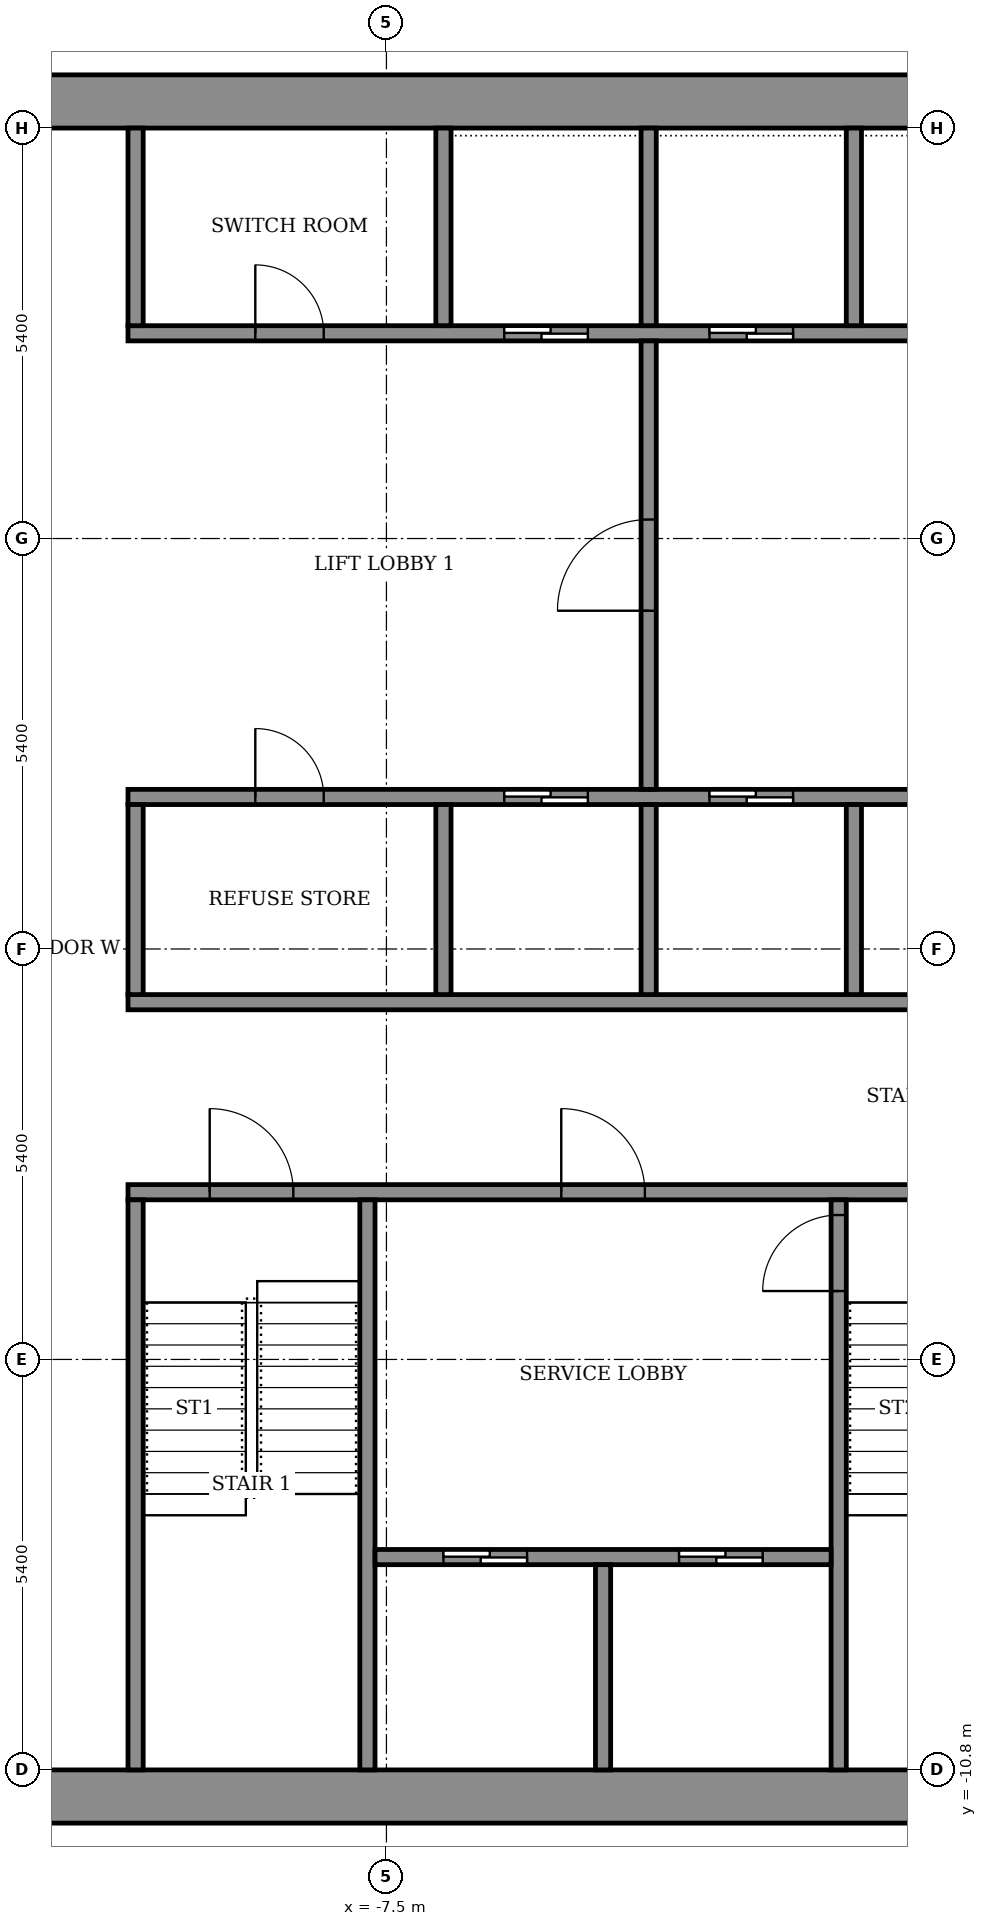
"""IFC4 building model, lengths in metres.
Left out: names, types, materials, properties, quantities, classifications, styles, units other than length and angle.
Written with IfcOpenShell. Run it as: python <this file> out.ifc"""

import sys

from ifc_helpers import new_model, si_unit, direction, frame, frame_2d, origin, place, context, subcontext, project, spatial, rectangle, extrude, element, fill, save


model = new_model("IFC4")
c1 = context("Model", 3, precision=1e-05, world=origin(), true_north=direction((0.0, 1.0)))
c2 = subcontext(c1, "Body", "Model", "MODEL_VIEW")
j1 = project(units=[si_unit("LENGTHUNIT", "METRE"), si_unit("PLANEANGLEUNIT", "RADIAN")], contexts=[c1])
p1 = place(None, origin())
s1 = spatial("IfcSite", under=j1, at=p1, CompositionType="ELEMENT")
p2 = place(p1, origin())
s2 = spatial("IfcBuilding", under=s1, at=p2, CompositionType="ELEMENT")
p3 = place(p2, frame((0.0, 0.0, 271.7)))
s3 = spatial("IfcBuildingStorey", under=s2, at=p3, CompositionType="ELEMENT", Elevation=271.7)
for number, where, z_axis, x_axis in (
    (1, (-14.5, -11.15, 0.0), (0.0, 0.0, 1.0), (1.0, 0.0, 0.0)),
    (2, (-14.5, 11.15, 0.0), (0.0, 0.0, 1.0), (1.0, 0.0, 0.0)),
):
    element("IfcWall", number, at=place(p3, frame(where, z_axis=z_axis, x_axis=x_axis)), inside=s3, PredefinedType="SHEAR", context=c2, shape_type="SweptSolid", body=[
        extrude(rectangle(XDim=29.0, YDim=0.7, at=frame_2d((14.5, 0.0))), origin(), (0.0, 0.0, 1.0), 3.6),
    ])
p4 = place(p3, frame((-10.9, -3.2, 0.0), z_axis=(0.0, 0.0, 1.0), x_axis=(1.0, 0.0, 0.0)))
e3 = element("IfcWall", 3, at=p4, inside=s3, PredefinedType="SHEAR", context=c2, shape_type="SweptSolid", body=[
    extrude(rectangle(XDim=21.8, YDim=0.2, at=frame_2d((10.9, 0.0))), origin(), (0.0, 0.0, 1.0), 3.05),
])
p5 = place(p4, frame((1.075, 0.0, 0.0)))
e4 = element("IfcOpeningElement", 4, at=p5, cuts=e3, PredefinedType="OPENING", context=c2, shape_type="SweptSolid", body=[
    extrude(rectangle(XDim=1.1, YDim=2.1, at=frame_2d((0.55, 1.05))), frame((0.0, 0.11, 0.0), z_axis=(0.0, -1.0, 0.0), x_axis=(1.0, 0.0, 0.0)), (0.0, 0.0, 1.0), 0.22),
])
p6 = place(p4, frame((10.325, 0.0, 0.0)))
e5 = element("IfcOpeningElement", 5, at=p6, cuts=e3, PredefinedType="OPENING", context=c2, shape_type="SweptSolid", body=[
    extrude(rectangle(XDim=1.1, YDim=2.1, at=frame_2d((0.55, 1.05))), frame((0.0, 0.11, 0.0), z_axis=(0.0, -1.0, 0.0), x_axis=(1.0, 0.0, 0.0)), (0.0, 0.0, 1.0), 0.22),
])
p7 = place(p4, frame((19.625, 0.0, 0.0)))
e6 = element("IfcOpeningElement", 6, at=p7, cuts=e3, PredefinedType="OPENING", context=c2, shape_type="SweptSolid", body=[
    extrude(rectangle(XDim=1.1, YDim=2.1, at=frame_2d((0.55, 1.05))), frame((0.0, 0.11, 0.0), z_axis=(0.0, -1.0, 0.0), x_axis=(1.0, 0.0, 0.0)), (0.0, 0.0, 1.0), 0.22),
])
p8 = place(p4, frame((5.7, 0.0, 0.0)))
e7 = element("IfcOpeningElement", 7, at=p8, cuts=e3, PredefinedType="OPENING", context=c2, shape_type="SweptSolid", body=[
    extrude(rectangle(XDim=1.1, YDim=2.1, at=frame_2d((0.55, 1.05))), frame((0.0, 0.11, 0.0), z_axis=(0.0, -1.0, 0.0), x_axis=(1.0, 0.0, 0.0)), (0.0, 0.0, 1.0), 0.22),
])
p9 = place(p4, frame((14.975, 0.0, 0.0)))
e8 = element("IfcOpeningElement", 8, at=p9, cuts=e3, PredefinedType="OPENING", context=c2, shape_type="SweptSolid", body=[
    extrude(rectangle(XDim=1.1, YDim=2.1, at=frame_2d((0.55, 1.05))), frame((0.0, 0.11, 0.0), z_axis=(0.0, -1.0, 0.0), x_axis=(1.0, 0.0, 0.0)), (0.0, 0.0, 1.0), 0.22),
])
p10 = place(p3, frame((-10.9, -0.7, 0.0), z_axis=(0.0, 0.0, 1.0), x_axis=(1.0, 0.0, 0.0)))
e9 = element("IfcWall", 9, at=p10, inside=s3, PredefinedType="SHEAR", context=c2, shape_type="SweptSolid", body=[
    extrude(rectangle(XDim=21.8, YDim=0.2, at=frame_2d((10.9, 0.0))), origin(), (0.0, 0.0, 1.0), 3.05),
])
p11 = place(p3, frame((-10.9, 2.0, 0.0), z_axis=(0.0, 0.0, 1.0), x_axis=(1.0, 0.0, 0.0)))
e10 = element("IfcWall", 10, at=p11, inside=s3, PredefinedType="SHEAR", context=c2, shape_type="SweptSolid", body=[
    extrude(rectangle(XDim=21.8, YDim=0.2, at=frame_2d((10.9, 0.0))), origin(), (0.0, 0.0, 1.0), 3.05),
])
p12 = place(p11, frame((4.95, 0.0, 0.0)))
e11 = element("IfcOpeningElement", 11, at=p12, cuts=e10, PredefinedType="OPENING", context=c2, shape_type="SweptSolid", body=[
    extrude(rectangle(XDim=1.1, YDim=2.1, at=frame_2d((0.55, 1.05))), frame((0.0, 0.11, 0.0), z_axis=(0.0, -1.0, 0.0), x_axis=(1.0, 0.0, 0.0)), (0.0, 0.0, 1.0), 0.22),
])
p13 = place(p11, frame((7.65, 0.0, 0.0)))
e12 = element("IfcOpeningElement", 12, at=p13, cuts=e10, PredefinedType="OPENING", context=c2, shape_type="SweptSolid", body=[
    extrude(rectangle(XDim=1.1, YDim=2.1, at=frame_2d((0.55, 1.05))), frame((0.0, 0.11, 0.0), z_axis=(0.0, -1.0, 0.0), x_axis=(1.0, 0.0, 0.0)), (0.0, 0.0, 1.0), 0.22),
])
p14 = place(p11, frame((10.35, 0.0, 0.0)))
e13 = element("IfcOpeningElement", 13, at=p14, cuts=e10, PredefinedType="OPENING", context=c2, shape_type="SweptSolid", body=[
    extrude(rectangle(XDim=1.1, YDim=2.1, at=frame_2d((0.55, 1.05))), frame((0.0, 0.11, 0.0), z_axis=(0.0, -1.0, 0.0), x_axis=(1.0, 0.0, 0.0)), (0.0, 0.0, 1.0), 0.22),
])
p15 = place(p11, frame((1.675, 0.0, 0.0)))
e14 = element("IfcOpeningElement", 14, at=p15, cuts=e10, PredefinedType="OPENING", context=c2, shape_type="SweptSolid", body=[
    extrude(rectangle(XDim=0.9, YDim=2.1, at=frame_2d((0.45, 1.05))), frame((0.0, 0.11, 0.0), z_axis=(0.0, -1.0, 0.0), x_axis=(1.0, 0.0, 0.0)), (0.0, 0.0, 1.0), 0.22),
])
p16 = place(p11, frame((13.825, 0.0, 0.0)))
e15 = element("IfcOpeningElement", 15, at=p16, cuts=e10, PredefinedType="OPENING", context=c2, shape_type="SweptSolid", body=[
    extrude(rectangle(XDim=0.9, YDim=2.1, at=frame_2d((0.45, 1.05))), frame((0.0, 0.11, 0.0), z_axis=(0.0, -1.0, 0.0), x_axis=(1.0, 0.0, 0.0)), (0.0, 0.0, 1.0), 0.22),
])
p17 = place(p11, frame((18.55, 0.0, 0.0)))
e16 = element("IfcOpeningElement", 16, at=p17, cuts=e10, PredefinedType="OPENING", context=c2, shape_type="SweptSolid", body=[
    extrude(rectangle(XDim=0.9, YDim=2.1, at=frame_2d((0.45, 1.05))), frame((0.0, 0.11, 0.0), z_axis=(0.0, -1.0, 0.0), x_axis=(1.0, 0.0, 0.0)), (0.0, 0.0, 1.0), 0.22),
])
p18 = place(p3, frame((-10.9, 8.1, 0.0), z_axis=(0.0, 0.0, 1.0), x_axis=(1.0, 0.0, 0.0)))
e17 = element("IfcWall", 17, at=p18, inside=s3, PredefinedType="SHEAR", context=c2, shape_type="SweptSolid", body=[
    extrude(rectangle(XDim=21.8, YDim=0.2, at=frame_2d((10.9, 0.0))), origin(), (0.0, 0.0, 1.0), 3.05),
])
p19 = place(p18, frame((4.95, 0.0, 0.0)))
e18 = element("IfcOpeningElement", 18, at=p19, cuts=e17, PredefinedType="OPENING", context=c2, shape_type="SweptSolid", body=[
    extrude(rectangle(XDim=1.1, YDim=2.1, at=frame_2d((0.55, 1.05))), frame((0.0, 0.11, 0.0), z_axis=(0.0, -1.0, 0.0), x_axis=(1.0, 0.0, 0.0)), (0.0, 0.0, 1.0), 0.22),
])
p20 = place(p18, frame((7.65, 0.0, 0.0)))
e19 = element("IfcOpeningElement", 19, at=p20, cuts=e17, PredefinedType="OPENING", context=c2, shape_type="SweptSolid", body=[
    extrude(rectangle(XDim=1.1, YDim=2.1, at=frame_2d((0.55, 1.05))), frame((0.0, 0.11, 0.0), z_axis=(0.0, -1.0, 0.0), x_axis=(1.0, 0.0, 0.0)), (0.0, 0.0, 1.0), 0.22),
])
p21 = place(p18, frame((10.35, 0.0, 0.0)))
e20 = element("IfcOpeningElement", 20, at=p21, cuts=e17, PredefinedType="OPENING", context=c2, shape_type="SweptSolid", body=[
    extrude(rectangle(XDim=1.1, YDim=2.1, at=frame_2d((0.55, 1.05))), frame((0.0, 0.11, 0.0), z_axis=(0.0, -1.0, 0.0), x_axis=(1.0, 0.0, 0.0)), (0.0, 0.0, 1.0), 0.22),
])
p22 = place(p18, frame((1.675, 0.0, 0.0)))
e21 = element("IfcOpeningElement", 21, at=p22, cuts=e17, PredefinedType="OPENING", context=c2, shape_type="SweptSolid", body=[
    extrude(rectangle(XDim=0.9, YDim=2.1, at=frame_2d((0.45, 1.05))), frame((0.0, 0.11, 0.0), z_axis=(0.0, -1.0, 0.0), x_axis=(1.0, 0.0, 0.0)), (0.0, 0.0, 1.0), 0.22),
])
p23 = place(p18, frame((13.825, 0.0, 0.0)))
e22 = element("IfcOpeningElement", 22, at=p23, cuts=e17, PredefinedType="OPENING", context=c2, shape_type="SweptSolid", body=[
    extrude(rectangle(XDim=0.9, YDim=2.1, at=frame_2d((0.45, 1.05))), frame((0.0, 0.11, 0.0), z_axis=(0.0, -1.0, 0.0), x_axis=(1.0, 0.0, 0.0)), (0.0, 0.0, 1.0), 0.22),
])
p24 = place(p18, frame((18.55, 0.0, 0.0)))
e23 = element("IfcOpeningElement", 23, at=p24, cuts=e17, PredefinedType="OPENING", context=c2, shape_type="SweptSolid", body=[
    extrude(rectangle(XDim=0.9, YDim=2.1, at=frame_2d((0.45, 1.05))), frame((0.0, 0.11, 0.0), z_axis=(0.0, -1.0, 0.0), x_axis=(1.0, 0.0, 0.0)), (0.0, 0.0, 1.0), 0.22),
])
for number, where, z_axis, x_axis in (
    (24, (-10.8, -10.8, 0.0), (0.0, 0.0, 1.0), (0.0, 1.0, 0.0)),
    (25, (-7.75, -10.8, 0.0), (0.0, 0.0, 1.0), (0.0, 1.0, 0.0)),
):
    element("IfcWall", number, at=place(p3, frame(where, z_axis=z_axis, x_axis=x_axis)), inside=s3, PredefinedType="SHEAR", context=c2, shape_type="SweptSolid", body=[
        extrude(rectangle(XDim=7.5, YDim=0.2, at=frame_2d((3.75, 0.0))), origin(), (0.0, 0.0, 1.0), 3.05),
    ])
p25 = place(p3, frame((-1.55, -10.8, 0.0), z_axis=(0.0, 0.0, 1.0), x_axis=(0.0, 1.0, 0.0)))
e26 = element("IfcWall", 26, at=p25, inside=s3, PredefinedType="SHEAR", context=c2, shape_type="SweptSolid", body=[
    extrude(rectangle(XDim=7.5, YDim=0.2, at=frame_2d((3.75, 0.0))), origin(), (0.0, 0.0, 1.0), 3.05),
])
p26 = place(p25, frame((6.3, 0.0, 0.0)))
e27 = element("IfcOpeningElement", 27, at=p26, cuts=e26, PredefinedType="OPENING", context=c2, shape_type="SweptSolid", body=[
    extrude(rectangle(XDim=1.0, YDim=2.1, at=frame_2d((0.5, 1.05))), frame((0.0, 0.11, 0.0), z_axis=(0.0, -1.0, 0.0), x_axis=(1.0, 0.0, 0.0)), (0.0, 0.0, 1.0), 0.22),
])
p27 = place(p3, frame((-7.65, -8.0, 0.0), z_axis=(0.0, 0.0, 1.0), x_axis=(1.0, 0.0, 0.0)))
e28 = element("IfcWall", 28, at=p27, inside=s3, PredefinedType="SHEAR", context=c2, shape_type="SweptSolid", body=[
    extrude(rectangle(XDim=6.0, YDim=0.2, at=frame_2d((3.0, 0.0))), origin(), (0.0, 0.0, 1.0), 3.05),
])
p28 = place(p27, frame((0.9, 0.0, 0.0)))
e29 = element("IfcOpeningElement", 29, at=p28, cuts=e28, PredefinedType="OPENING", context=c2, shape_type="SweptSolid", body=[
    extrude(rectangle(XDim=1.1, YDim=2.1, at=frame_2d((0.55, 1.05))), frame((0.0, 0.11, 0.0), z_axis=(0.0, -1.0, 0.0), x_axis=(1.0, 0.0, 0.0)), (0.0, 0.0, 1.0), 0.22),
])
p29 = place(p27, frame((4.0, 0.0, 0.0)))
e30 = element("IfcOpeningElement", 30, at=p29, cuts=e28, PredefinedType="OPENING", context=c2, shape_type="SweptSolid", body=[
    extrude(rectangle(XDim=1.1, YDim=2.1, at=frame_2d((0.55, 1.05))), frame((0.0, 0.11, 0.0), z_axis=(0.0, -1.0, 0.0), x_axis=(1.0, 0.0, 0.0)), (0.0, 0.0, 1.0), 0.22),
])
p30 = place(p3, frame((-4.65, -10.8, 0.0), z_axis=(0.0, 0.0, 1.0), x_axis=(0.0, 1.0, 0.0)))
e31 = element("IfcWall", 31, at=p30, inside=s3, PredefinedType="SHEAR", context=c2, shape_type="SweptSolid", body=[
    extrude(rectangle(XDim=2.7, YDim=0.2, at=frame_2d((1.35, 0.0))), origin(), (0.0, 0.0, 1.0), 3.05),
])
p31 = place(p3, frame((-10.8, -0.6, 0.0), z_axis=(0.0, 0.0, 1.0), x_axis=(0.0, 1.0, 0.0)))
e32 = element("IfcWall", 32, at=p31, inside=s3, PredefinedType="STANDARD", context=c2, shape_type="SweptSolid", body=[
    extrude(rectangle(XDim=2.5, YDim=0.2, at=frame_2d((1.25, 0.0))), origin(), (0.0, 0.0, 1.0), 3.05),
])
for number, where, z_axis, x_axis in (
    (33, (-6.75, -0.6, 0.0), (0.0, 0.0, 1.0), (0.0, 1.0, 0.0)),
    (34, (-4.05, -0.6, 0.0), (0.0, 0.0, 1.0), (0.0, 1.0, 0.0)),
    (35, (-1.35, -0.6, 0.0), (0.0, 0.0, 1.0), (0.0, 1.0, 0.0)),
):
    element("IfcWall", number, at=place(p3, frame(where, z_axis=z_axis, x_axis=x_axis)), inside=s3, PredefinedType="SHEAR", context=c2, shape_type="SweptSolid", body=[
        extrude(rectangle(XDim=2.5, YDim=0.2, at=frame_2d((1.25, 0.0))), origin(), (0.0, 0.0, 1.0), 3.05),
    ])
p32 = place(p3, frame((-10.8, 8.2, 0.0), z_axis=(0.0, 0.0, 1.0), x_axis=(0.0, 1.0, 0.0)))
e36 = element("IfcWall", 36, at=p32, inside=s3, PredefinedType="STANDARD", context=c2, shape_type="SweptSolid", body=[
    extrude(rectangle(XDim=2.6, YDim=0.2, at=frame_2d((1.3, 0.0))), origin(), (0.0, 0.0, 1.0), 3.05),
])
for number, where, z_axis, x_axis in (
    (37, (-6.75, 8.2, 0.0), (0.0, 0.0, 1.0), (0.0, 1.0, 0.0)),
    (38, (-4.05, 8.2, 0.0), (0.0, 0.0, 1.0), (0.0, 1.0, 0.0)),
    (39, (-1.35, 8.2, 0.0), (0.0, 0.0, 1.0), (0.0, 1.0, 0.0)),
):
    element("IfcWall", number, at=place(p3, frame(where, z_axis=z_axis, x_axis=x_axis)), inside=s3, PredefinedType="SHEAR", context=c2, shape_type="SweptSolid", body=[
        extrude(rectangle(XDim=2.6, YDim=0.2, at=frame_2d((1.3, 0.0))), origin(), (0.0, 0.0, 1.0), 3.05),
    ])
p33 = place(p3, frame((-4.05, 2.1, 0.0), z_axis=(0.0, 0.0, 1.0), x_axis=(0.0, 1.0, 0.0)))
e40 = element("IfcWall", 40, at=p33, inside=s3, PredefinedType="STANDARD", context=c2, shape_type="SweptSolid", body=[
    extrude(rectangle(XDim=5.9, YDim=0.2, at=frame_2d((2.95, 0.0))), origin(), (0.0, 0.0, 1.0), 3.05),
])
p34 = place(p33, frame((2.35, 0.0, 0.0)))
e41 = element("IfcOpeningElement", 41, at=p34, cuts=e40, PredefinedType="OPENING", context=c2, shape_type="SweptSolid", body=[
    extrude(rectangle(XDim=1.2, YDim=2.1, at=frame_2d((0.6, 1.05))), frame((0.0, 0.11, 0.0), z_axis=(0.0, -1.0, 0.0), x_axis=(1.0, 0.0, 0.0)), (0.0, 0.0, 1.0), 0.22),
])
p35 = place(p12, origin())
e42 = element("IfcDoor", 42, at=p35, inside=s3, OperationType="SLIDING_TO_LEFT", PredefinedType="DOOR", context=c2, shape_type="SweptSolid", body=[
    extrude(rectangle(XDim=1.1, YDim=2.1, at=frame_2d((0.55, 1.05))), frame((0.0, 0.025, 0.0), z_axis=(0.0, -1.0, 0.0), x_axis=(1.0, 0.0, 0.0)), (0.0, 0.0, 1.0), 0.05),
])
fill(e11, e42)
p36 = place(p13, origin())
e43 = element("IfcDoor", 43, at=p36, inside=s3, OperationType="SLIDING_TO_LEFT", PredefinedType="DOOR", context=c2, shape_type="SweptSolid", body=[
    extrude(rectangle(XDim=1.1, YDim=2.1, at=frame_2d((0.55, 1.05))), frame((0.0, 0.025, 0.0), z_axis=(0.0, -1.0, 0.0), x_axis=(1.0, 0.0, 0.0)), (0.0, 0.0, 1.0), 0.05),
])
fill(e12, e43)
p37 = place(p19, origin())
e44 = element("IfcDoor", 44, at=p37, inside=s3, OperationType="SLIDING_TO_LEFT", PredefinedType="DOOR", context=c2, shape_type="SweptSolid", body=[
    extrude(rectangle(XDim=1.1, YDim=2.1, at=frame_2d((0.55, 1.05))), frame((0.0, 0.025, 0.0), z_axis=(0.0, -1.0, 0.0), x_axis=(1.0, 0.0, 0.0)), (0.0, 0.0, 1.0), 0.05),
])
fill(e18, e44)
p38 = place(p20, origin())
e45 = element("IfcDoor", 45, at=p38, inside=s3, OperationType="SLIDING_TO_LEFT", PredefinedType="DOOR", context=c2, shape_type="SweptSolid", body=[
    extrude(rectangle(XDim=1.1, YDim=2.1, at=frame_2d((0.55, 1.05))), frame((0.0, 0.025, 0.0), z_axis=(0.0, -1.0, 0.0), x_axis=(1.0, 0.0, 0.0)), (0.0, 0.0, 1.0), 0.05),
])
fill(e19, e45)
p39 = place(p15, origin())
e46 = element("IfcDoor", 46, at=p39, inside=s3, OperationType="SINGLE_SWING_RIGHT", PredefinedType="DOOR", context=c2, shape_type="SweptSolid", body=[
    extrude(rectangle(XDim=0.9, YDim=2.1, at=frame_2d((0.45, 1.05))), frame((0.0, 0.025, 0.0), z_axis=(0.0, -1.0, 0.0), x_axis=(1.0, 0.0, 0.0)), (0.0, 0.0, 1.0), 0.05),
])
fill(e14, e46)
p40 = place(p22, origin())
e47 = element("IfcDoor", 47, at=p40, inside=s3, OperationType="SINGLE_SWING_LEFT", PredefinedType="DOOR", context=c2, shape_type="SweptSolid", body=[
    extrude(rectangle(XDim=0.9, YDim=2.1, at=frame_2d((0.45, 1.05))), frame((0.0, 0.025, 0.0), z_axis=(0.0, -1.0, 0.0), x_axis=(1.0, 0.0, 0.0)), (0.0, 0.0, 1.0), 0.05),
])
fill(e21, e47)
p41 = place(p28, origin())
e48 = element("IfcDoor", 48, at=p41, inside=s3, OperationType="SLIDING_TO_LEFT", PredefinedType="DOOR", context=c2, shape_type="SweptSolid", body=[
    extrude(rectangle(XDim=1.1, YDim=2.1, at=frame_2d((0.55, 1.05))), frame((0.0, 0.025, 0.0), z_axis=(0.0, -1.0, 0.0), x_axis=(1.0, 0.0, 0.0)), (0.0, 0.0, 1.0), 0.05),
])
fill(e29, e48)
p42 = place(p29, origin())
e49 = element("IfcDoor", 49, at=p42, inside=s3, OperationType="SLIDING_TO_LEFT", PredefinedType="DOOR", context=c2, shape_type="SweptSolid", body=[
    extrude(rectangle(XDim=1.1, YDim=2.1, at=frame_2d((0.55, 1.05))), frame((0.0, 0.025, 0.0), z_axis=(0.0, -1.0, 0.0), x_axis=(1.0, 0.0, 0.0)), (0.0, 0.0, 1.0), 0.05),
])
fill(e30, e49)
p43 = place(p5, origin())
e50 = element("IfcDoor", 50, at=p43, inside=s3, OperationType="SINGLE_SWING_RIGHT", PredefinedType="DOOR", context=c2, shape_type="SweptSolid", body=[
    extrude(rectangle(XDim=1.1, YDim=2.1, at=frame_2d((0.55, 1.05))), frame((0.0, 0.025, 0.0), z_axis=(0.0, -1.0, 0.0), x_axis=(1.0, 0.0, 0.0)), (0.0, 0.0, 1.0), 0.05),
])
fill(e4, e50)
p44 = place(p8, origin())
e51 = element("IfcDoor", 51, at=p44, inside=s3, OperationType="SINGLE_SWING_LEFT", PredefinedType="DOOR", context=c2, shape_type="SweptSolid", body=[
    extrude(rectangle(XDim=1.1, YDim=2.1, at=frame_2d((0.55, 1.05))), frame((0.0, 0.025, 0.0), z_axis=(0.0, -1.0, 0.0), x_axis=(1.0, 0.0, 0.0)), (0.0, 0.0, 1.0), 0.05),
])
fill(e7, e51)
p45 = place(p26, origin())
e52 = element("IfcDoor", 52, at=p45, inside=s3, OperationType="SINGLE_SWING_RIGHT", PredefinedType="DOOR", context=c2, shape_type="SweptSolid", body=[
    extrude(rectangle(XDim=1.0, YDim=2.1, at=frame_2d((0.5, 1.05))), frame((0.0, 0.025, 0.0), z_axis=(0.0, -1.0, 0.0), x_axis=(1.0, 0.0, 0.0)), (0.0, 0.0, 1.0), 0.05),
])
fill(e27, e52)
p46 = place(p34, origin())
e53 = element("IfcDoor", 53, at=p46, inside=s3, OperationType="SINGLE_SWING_LEFT", PredefinedType="DOOR", context=c2, shape_type="SweptSolid", body=[
    extrude(rectangle(XDim=1.2, YDim=2.1, at=frame_2d((0.6, 1.05))), frame((0.0, 0.025, 0.0), z_axis=(0.0, -1.0, 0.0), x_axis=(1.0, 0.0, 0.0)), (0.0, 0.0, 1.0), 0.05),
])
fill(e41, e53)
save(model, sys.argv[1])
